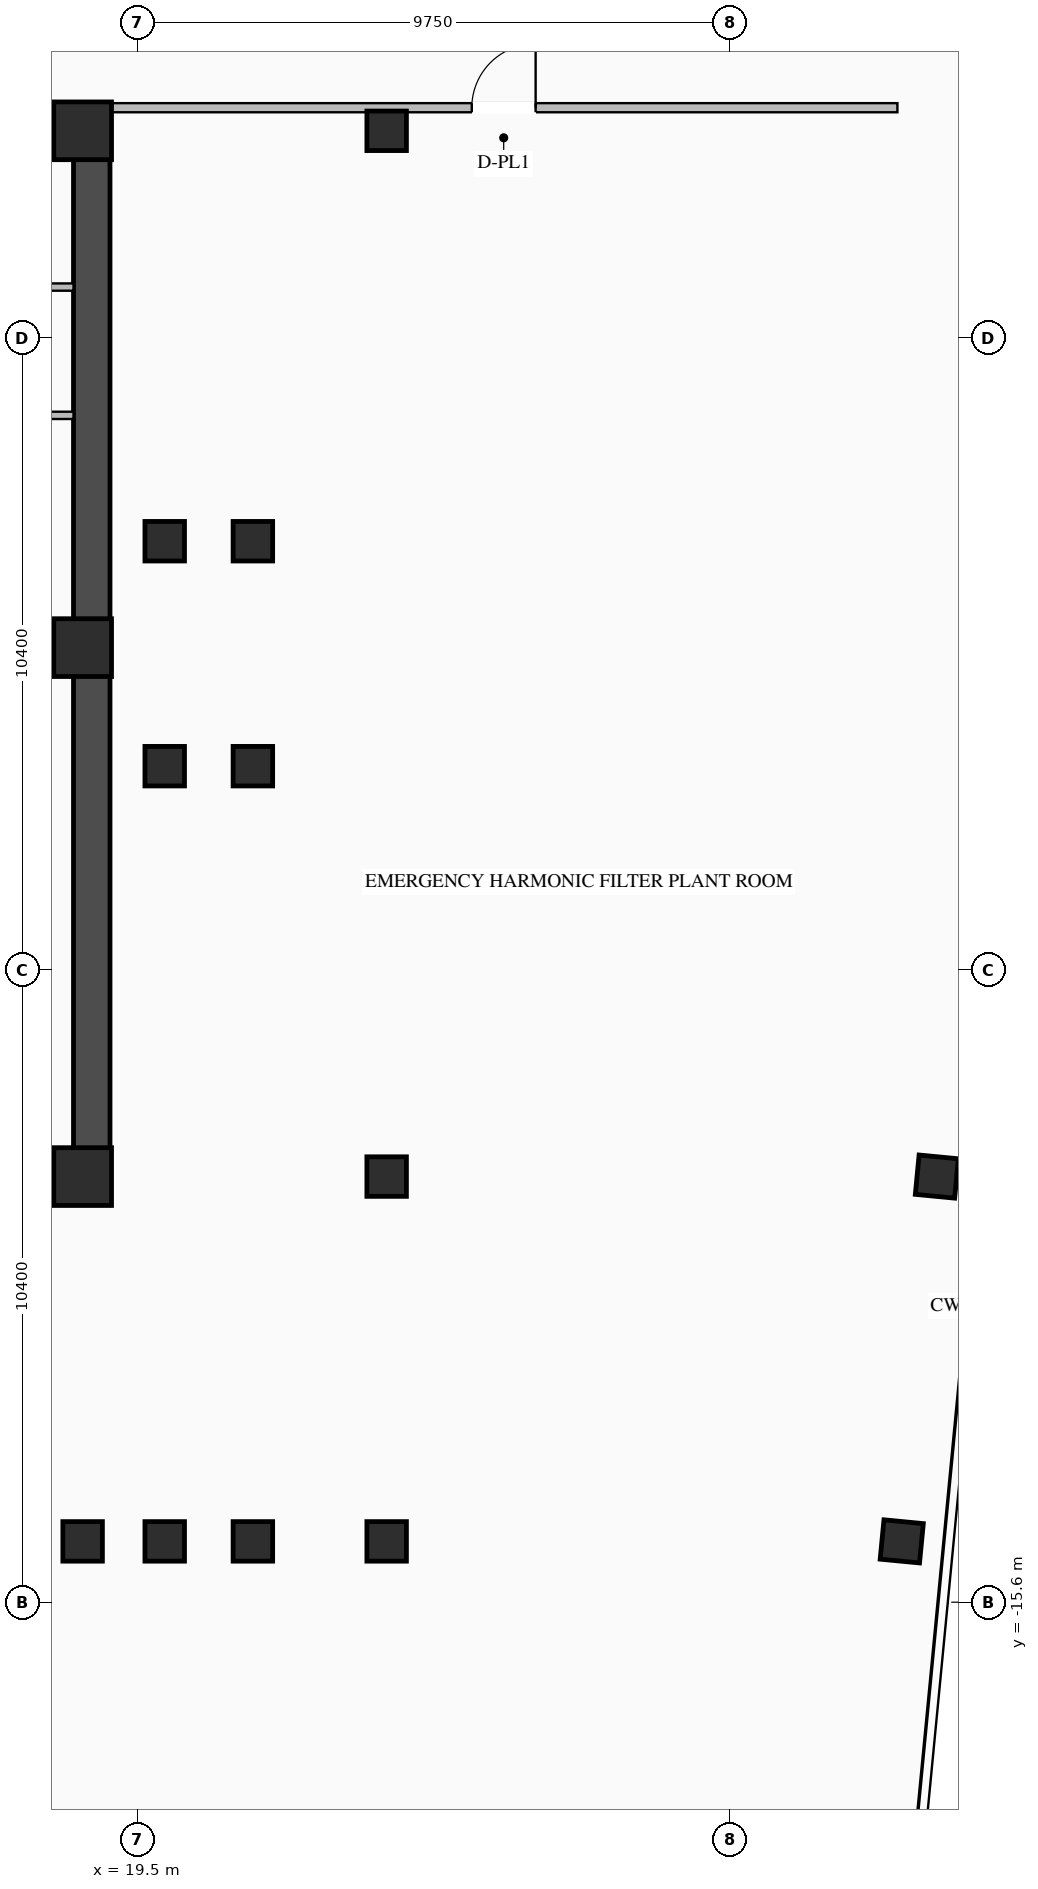
"""IFC4 building model, lengths in metres.
Left out: names, types, materials, properties, quantities, classifications, styles, units other than length and angle.
Written with IfcOpenShell. Run it as: python <this file> out.ifc"""

import sys

from ifc_helpers import new_model, si_unit, direction, frame, frame_2d, origin, origin_2d, place, context, subcontext, project, spatial, rectangle, i_section, extrude, element, fill, save


model = new_model("IFC4")
c1 = context("Model", 3, precision=1e-05, world=origin(), true_north=direction((0.0, 1.0)))
c2 = subcontext(c1, "Body", "Model", "MODEL_VIEW")
j1 = project(units=[si_unit("LENGTHUNIT", "METRE"), si_unit("PLANEANGLEUNIT", "RADIAN")], contexts=[c1])
p1 = place(None, origin())
s1 = spatial("IfcSite", under=j1, at=p1, CompositionType="ELEMENT")
p2 = place(p1, origin())
s2 = spatial("IfcBuilding", under=s1, at=p2, CompositionType="ELEMENT")
p3 = place(p2, frame((0.0, 0.0, 199.5)))
s3 = spatial("IfcBuildingStorey", under=s2, at=p3, CompositionType="ELEMENT", Elevation=199.5)
p4 = place(p3, frame((8.8, -8.75, 0.0), z_axis=(0.0, 0.0, 1.0), x_axis=(1.0, 0.0, 0.0)))
e1 = element("IfcWall", 1, at=p4, inside=s3, PredefinedType="SHEAR", context=c2, shape_type="SweptSolid", body=[
    extrude(rectangle(XDim=10.25, YDim=0.6, at=frame_2d((5.125, 0.0))), origin(), (0.0, 0.0, 1.0), 4.52),
])
p5 = place(p3, frame((8.8, 8.75, 0.0), z_axis=(0.0, 0.0, 1.0), x_axis=(1.0, 0.0, 0.0)))
e2 = element("IfcWall", 2, at=p5, inside=s3, PredefinedType="SHEAR", context=c2, shape_type="SweptSolid", body=[
    extrude(rectangle(XDim=10.25, YDim=0.6, at=frame_2d((5.125, 0.0))), origin(), (0.0, 0.0, 1.0), 4.52),
])
p6 = place(p5, frame((3.25, 0.0, 0.0)))
e3 = element("IfcOpeningElement", 3, at=p6, cuts=e2, PredefinedType="OPENING", context=c2, shape_type="SweptSolid", body=[
    extrude(rectangle(XDim=1.4, YDim=2.05, at=frame_2d((0.7, 1.025))), frame((0.0, 0.31, 0.0), z_axis=(0.0, -1.0, 0.0), x_axis=(1.0, 0.0, 0.0)), (0.0, 0.0, 1.0), 0.62),
])
p7 = place(p3, frame((18.75, -8.45, 0.0), z_axis=(0.0, 0.0, 1.0), x_axis=(0.0, 1.0, 0.0)))
e4 = element("IfcWall", 4, at=p7, inside=s3, PredefinedType="SHEAR", context=c2, shape_type="SweptSolid", body=[
    extrude(rectangle(XDim=16.9, YDim=0.6, at=frame_2d((8.45, 0.0))), origin(), (0.0, 0.0, 1.0), 4.52),
])
for number, where, z_axis, x_axis in (
    (5, (18.6, -8.6, 0.0), (0.0, 0.0, 1.0), (1.0, 0.0, 0.0)),
    (6, (18.6, 0.1, 0.0), (0.0, 0.0, 1.0), (1.0, 0.0, 0.0)),
    (7, (18.6, 8.6, 0.0), (0.0, 0.0, 1.0), (1.0, 0.0, 0.0)),
):
    element("IfcColumn", number, at=place(p3, frame(where, z_axis=z_axis, x_axis=x_axis)), inside=s3, PredefinedType="COLUMN", context=c2, shape_type="SweptSolid", body=[
        extrude(rectangle(XDim=0.95, YDim=0.95, at=origin_2d()), origin(), (0.0, 0.0, 1.0), 4.8),
    ])
for number, where, z_axis, x_axis in (
    (8, (18.6, -14.6, 0.0), (0.0, 0.0, 1.0), (1.0, 0.0, 0.0)),
    (9, (19.95, -14.6, 0.0), (0.0, 0.0, 1.0), (1.0, 0.0, 0.0)),
    (10, (21.4, -14.6, 0.0), (0.0, 0.0, 1.0), (1.0, 0.0, 0.0)),
    (11, (19.95, -1.85, 0.0), (0.0, 0.0, 1.0), (1.0, 0.0, 0.0)),
    (12, (19.95, 1.85, 0.0), (0.0, 0.0, 1.0), (1.0, 0.0, 0.0)),
    (13, (21.4, -1.85, 0.0), (0.0, 0.0, 1.0), (1.0, 0.0, 0.0)),
    (14, (21.4, 1.85, 0.0), (0.0, 0.0, 1.0), (1.0, 0.0, 0.0)),
    (15, (23.6, -14.6, 0.0), (0.0, 0.0, 1.0), (1.0, 0.0, 0.0)),
    (16, (23.6, -8.6, 0.0), (0.0, 0.0, 1.0), (1.0, 0.0, 0.0)),
    (17, (23.6, 8.6, 0.0), (0.0, 0.0, 1.0), (1.0, 0.0, 0.0)),
    (18, (32.071, -14.6, 0.0), (0.0, 0.0, 1.0), (0.995, -0.096, 0.0)),
    (19, (32.649, -8.6, 0.0), (0.0, 0.0, 1.0), (0.995, -0.096, 0.0)),
):
    element("IfcColumn", number, at=place(p3, frame(where, z_axis=z_axis, x_axis=x_axis)), inside=s3, PredefinedType="COLUMN", context=c2, shape_type="SweptSolid", body=[
        extrude(i_section(OverallWidth=0.65, OverallDepth=0.65, WebThickness=0.028, FlangeThickness=0.04, at=origin_2d()), origin(), (0.0, 0.0, 1.0), 4.8),
    ])
p8 = place(p3, frame((13.9, 3.92, 0.0), z_axis=(0.0, 0.0, 1.0), x_axis=(1.0, 0.0, 0.0)))
e20 = element("IfcWall", 20, at=p8, inside=s3, PredefinedType="STANDARD", context=c2, shape_type="SweptSolid", body=[
    extrude(rectangle(XDim=4.55, YDim=0.12, at=frame_2d((2.275, 0.0))), origin(), (0.0, 0.0, 1.0), 4.5),
])
p9 = place(p3, frame((16.15, 6.03, 0.0), z_axis=(0.0, 0.0, 1.0), x_axis=(1.0, 0.0, 0.0)))
e21 = element("IfcWall", 21, at=p9, inside=s3, PredefinedType="STANDARD", context=c2, shape_type="SweptSolid", body=[
    extrude(rectangle(XDim=2.3, YDim=0.12, at=frame_2d((1.15, 0.0))), origin(), (0.0, 0.0, 1.0), 4.5),
])
p10 = place(p3, frame((19.05, 8.98, 0.0), z_axis=(0.0, 0.0, 1.0), x_axis=(1.0, 0.0, 0.0)))
e22 = element("IfcWall", 22, at=p10, inside=s3, PredefinedType="STANDARD", context=c2, shape_type="SweptSolid", body=[
    extrude(rectangle(XDim=12.95, YDim=0.15, at=frame_2d((6.475, 0.0))), origin(), (0.0, 0.0, 1.0), 4.5),
])
p11 = place(p10, frame((5.95, 0.0, 0.0)))
e23 = element("IfcOpeningElement", 23, at=p11, cuts=e22, PredefinedType="OPENING", context=c2, shape_type="SweptSolid", body=[
    extrude(rectangle(XDim=1.05, YDim=2.08, at=frame_2d((0.525, 1.04))), frame((0.0, 0.085, 0.0), z_axis=(0.0, -1.0, 0.0), x_axis=(1.0, 0.0, 0.0)), (0.0, 0.0, 1.0), 0.17),
])
p12 = place(p11, origin())
e24 = element("IfcDoor", 24, at=p12, inside=s3, OperationType="SINGLE_SWING_RIGHT", PredefinedType="DOOR", context=c2, shape_type="SweptSolid", body=[
    extrude(rectangle(XDim=1.05, YDim=2.08, at=frame_2d((0.525, 1.04))), frame((0.0, 0.025, 0.0), z_axis=(0.0, -1.0, 0.0), x_axis=(1.0, 0.0, 0.0)), (0.0, 0.0, 1.0), 0.05),
])
fill(e23, e24)
save(model, sys.argv[1])
